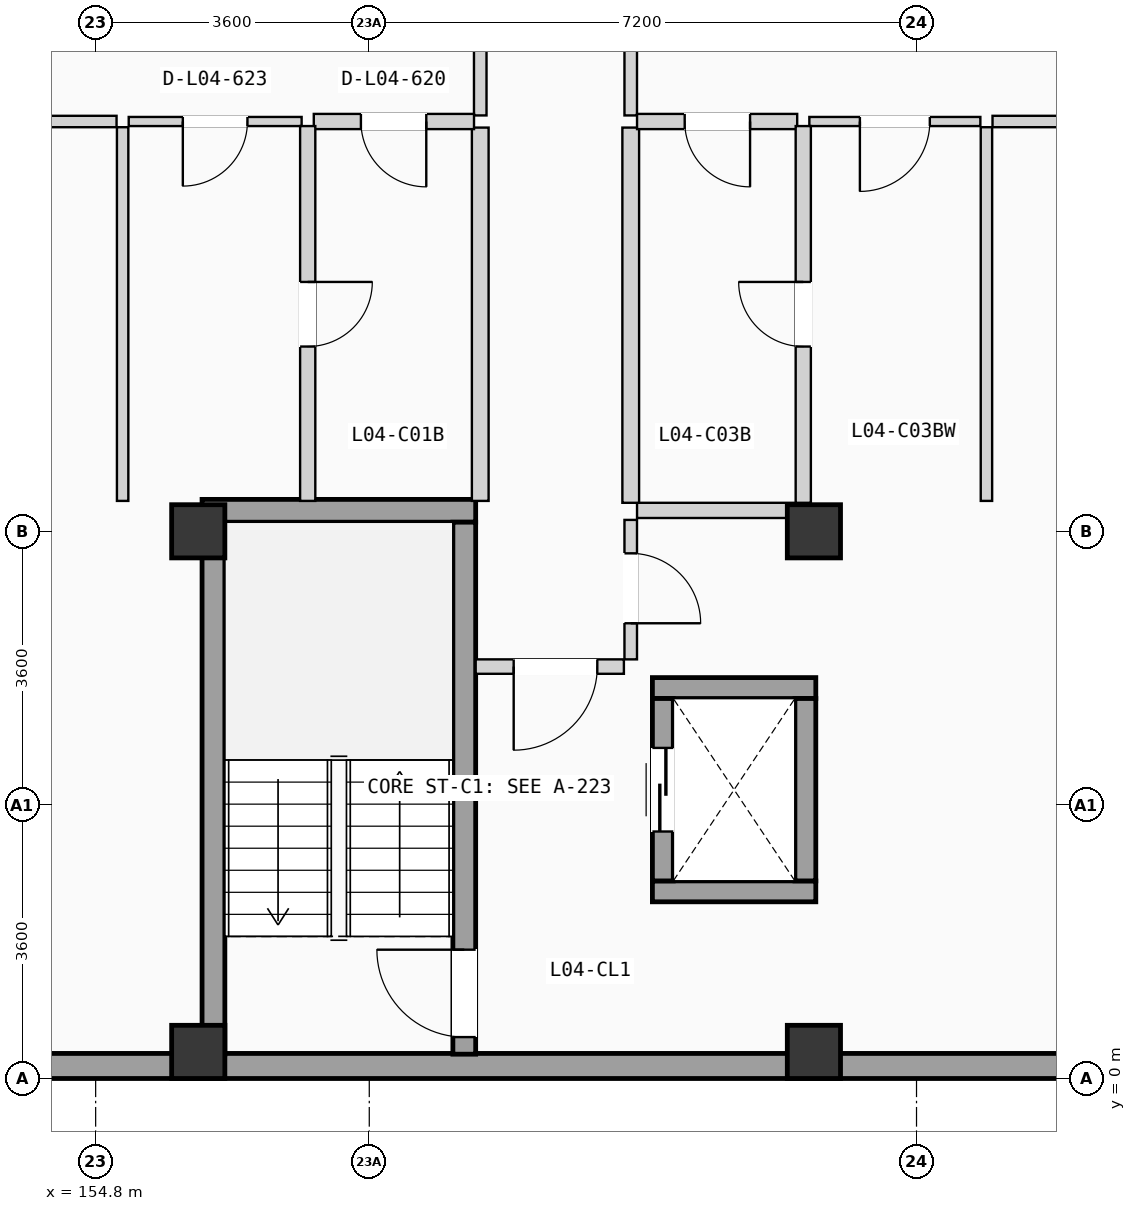
"""IFC4 building model, lengths in metres.
Left out: names, types, materials, properties, quantities, classifications, styles, units other than length and angle.
Written with IfcOpenShell. Run it as: python <this file> out.ifc"""

import sys

from ifc_helpers import new_model, si_unit, direction, frame, frame_2d, origin, origin_2d, place, context, subcontext, project, spatial, rectangle, extrude, element, fill, save


model = new_model("IFC4")
c1 = context("Model", 3, precision=1e-05, world=origin(), true_north=direction((0.0, 1.0)))
c2 = subcontext(c1, "Body", "Model", "MODEL_VIEW")
j1 = project(units=[si_unit("LENGTHUNIT", "METRE"), si_unit("PLANEANGLEUNIT", "RADIAN")], contexts=[c1])
p1 = place(None, origin())
s1 = spatial("IfcSite", under=j1, at=p1, CompositionType="ELEMENT")
p2 = place(p1, origin())
s2 = spatial("IfcBuilding", under=s1, at=p2, CompositionType="ELEMENT")
p3 = place(p2, frame((0.0, 0.0, 15.225)))
s3 = spatial("IfcBuildingStorey", under=s2, at=p3, CompositionType="ELEMENT", Elevation=15.225)
for number, where, z_axis, x_axis in (
    (1, (156.15, 0.35, 0.0), (0.0, 0.0, 1.0), (1.0, 0.0, 0.0)),
    (2, (156.15, 7.2, 0.0), (0.0, 0.0, 1.0), (1.0, 0.0, 0.0)),
    (3, (164.25, 0.35, 0.0), (0.0, 0.0, 1.0), (1.0, 0.0, 0.0)),
    (4, (164.25, 7.2, 0.0), (0.0, 0.0, 1.0), (1.0, 0.0, 0.0)),
):
    element("IfcColumn", number, at=place(p3, frame(where, z_axis=z_axis, x_axis=x_axis)), inside=s3, PredefinedType="COLUMN", context=c2, shape_type="SweptSolid", body=[
        extrude(rectangle(XDim=0.7, YDim=0.7, at=origin_2d()), origin(), (0.0, 0.0, 1.0), 3.15),
    ])
p4 = place(p3, frame((147.6, 0.165, 0.0), z_axis=(0.0, 0.0, 1.0), x_axis=(1.0, 0.0, 0.0)))
e5 = element("IfcWall", 5, at=p4, inside=s3, PredefinedType="SOLIDWALL", context=c2, shape_type="SweptSolid", body=[
    extrude(rectangle(XDim=25.2, YDim=0.33, at=frame_2d((12.6, 0.0))), origin(), (0.0, 0.0, 1.0), 2.89),
])
p5 = place(p3, frame((156.2, 7.47, 0.0), z_axis=(0.0, 0.0, 1.0), x_axis=(1.0, 0.0, 0.0)))
e6 = element("IfcWall", 6, at=p5, inside=s3, PredefinedType="SHEAR", context=c2, shape_type="SweptSolid", body=[
    extrude(rectangle(XDim=3.6, YDim=0.3, at=frame_2d((1.8, 0.0))), origin(), (0.0, 0.0, 1.0), 2.89),
])
p6 = place(p3, frame((156.35, 0.32, 0.0), z_axis=(0.0, 0.0, 1.0), x_axis=(0.0, 1.0, 0.0)))
e7 = element("IfcWall", 7, at=p6, inside=s3, PredefinedType="SHEAR", context=c2, shape_type="SweptSolid", body=[
    extrude(rectangle(XDim=7.0, YDim=0.3, at=frame_2d((3.5, 0.0))), origin(), (0.0, 0.0, 1.0), 2.89),
])
p7 = place(p3, frame((159.65, 0.32, 0.0), z_axis=(0.0, 0.0, 1.0), x_axis=(0.0, 1.0, 0.0)))
e8 = element("IfcWall", 8, at=p7, inside=s3, PredefinedType="SHEAR", context=c2, shape_type="SweptSolid", body=[
    extrude(rectangle(XDim=7.0, YDim=0.3, at=frame_2d((3.5, 0.0))), origin(), (0.0, 0.0, 1.0), 2.89),
])
p8 = place(p7, frame((0.225, 0.0, 0.0)))
e9 = element("IfcOpeningElement", 9, at=p8, cuts=e8, PredefinedType="OPENING", context=c2, shape_type="SweptSolid", body=[
    extrude(rectangle(XDim=1.15, YDim=2.12, at=frame_2d((0.575, 1.06))), frame((0.0, 0.16, 0.0), z_axis=(0.0, -1.0, 0.0), x_axis=(1.0, 0.0, 0.0)), (0.0, 0.0, 1.0), 0.32),
])
for number, where, z_axis, x_axis in (
    (10, (162.125, 2.462, 0.0), (0.0, 0.0, 1.0), (1.0, 0.0, 0.0)),
    (11, (162.125, 5.137, 0.0), (0.0, 0.0, 1.0), (1.0, 0.0, 0.0)),
):
    element("IfcWall", number, at=place(p3, frame(where, z_axis=z_axis, x_axis=x_axis)), inside=s3, PredefinedType="SHEAR", context=c2, shape_type="SweptSolid", body=[
        extrude(rectangle(XDim=2.15, YDim=0.275, at=frame_2d((1.075, 0.0))), origin(), (0.0, 0.0, 1.0), 2.89),
    ])
p9 = place(p3, frame((162.262, 2.6, 0.0), z_axis=(0.0, 0.0, 1.0), x_axis=(0.0, 1.0, 0.0)))
e12 = element("IfcWall", 12, at=p9, inside=s3, PredefinedType="SHEAR", context=c2, shape_type="SweptSolid", body=[
    extrude(rectangle(XDim=2.4, YDim=0.275, at=frame_2d((1.2, 0.0))), origin(), (0.0, 0.0, 1.0), 2.89),
])
p10 = place(p9, frame((0.65, 0.0, 0.0)))
e13 = element("IfcOpeningElement", 13, at=p10, cuts=e12, PredefinedType="OPENING", context=c2, shape_type="SweptSolid", body=[
    extrude(rectangle(XDim=1.1, YDim=2.15, at=frame_2d((0.55, 1.075))), frame((0.0, 0.147, 0.0), z_axis=(0.0, -1.0, 0.0), x_axis=(1.0, 0.0, 0.0)), (0.0, 0.0, 1.0), 0.295),
])
p11 = place(p3, frame((164.137, 2.6, 0.0), z_axis=(0.0, 0.0, 1.0), x_axis=(0.0, 1.0, 0.0)))
e14 = element("IfcWall", 14, at=p11, inside=s3, PredefinedType="SHEAR", context=c2, shape_type="SweptSolid", body=[
    extrude(rectangle(XDim=2.4, YDim=0.275, at=frame_2d((1.2, 0.0))), origin(), (0.0, 0.0, 1.0), 2.89),
])
p12 = place(p3, frame((159.8, 5.42, 0.0), z_axis=(0.0, 0.0, 1.0), x_axis=(1.0, 0.0, 0.0)))
e15 = element("IfcWall", 15, at=p12, inside=s3, PredefinedType="PARTITIONING", context=c2, shape_type="SweptSolid", body=[
    extrude(rectangle(XDim=1.95, YDim=0.19, at=frame_2d((0.975, 0.0))), origin(), (0.0, 0.0, 1.0), 2.87),
])
p13 = place(p12, frame((0.5, 0.0, 0.0)))
e16 = element("IfcOpeningElement", 16, at=p13, cuts=e15, PredefinedType="OPENING", context=c2, shape_type="SweptSolid", body=[
    extrude(rectangle(XDim=1.1, YDim=2.12, at=frame_2d((0.55, 1.06))), frame((0.0, 0.105, 0.0), z_axis=(0.0, -1.0, 0.0), x_axis=(1.0, 0.0, 0.0)), (0.0, 0.0, 1.0), 0.21),
])
p14 = place(p3, frame((161.84, 5.515, 0.0), z_axis=(0.0, 0.0, 1.0), x_axis=(0.0, 1.0, 0.0)))
e17 = element("IfcWall", 17, at=p14, inside=s3, PredefinedType="PARTITIONING", context=c2, shape_type="SweptSolid", body=[
    extrude(rectangle(XDim=1.835, YDim=0.165, at=frame_2d((0.917, 0.0))), origin(), (0.0, 0.0, 1.0), 2.87),
])
p15 = place(p14, frame((0.475, 0.0, 0.0)))
e18 = element("IfcOpeningElement", 18, at=p15, cuts=e17, PredefinedType="OPENING", context=c2, shape_type="SweptSolid", body=[
    extrude(rectangle(XDim=0.92, YDim=2.04, at=frame_2d((0.46, 1.02))), frame((0.0, 0.093, 0.0), z_axis=(0.0, -1.0, 0.0), x_axis=(1.0, 0.0, 0.0)), (0.0, 0.0, 1.0), 0.185),
])
p16 = place(p3, frame((161.923, 7.475, 0.0), z_axis=(0.0, 0.0, 1.0), x_axis=(1.0, 0.0, 0.0)))
e19 = element("IfcWall", 19, at=p16, inside=s3, PredefinedType="PLUMBINGWALL", context=c2, shape_type="SweptSolid", body=[
    extrude(rectangle(XDim=2.107, YDim=0.2, at=frame_2d((1.053, 0.0))), origin(), (0.0, 0.0, 1.0), 2.87),
])
p17 = place(p3, frame((159.86, 12.672, 0.0), z_axis=(0.0, 0.0, 1.0), x_axis=(0.0, 1.0, 0.0)))
e20 = element("IfcWall", 20, at=p17, inside=s3, PredefinedType="PARTITIONING", context=c2, shape_type="SweptSolid", body=[
    extrude(rectangle(XDim=5.958, YDim=0.165, at=frame_2d((2.979, 0.0))), origin(), (0.0, 0.0, 1.0), 2.87),
])
p18 = place(p17, frame((2.454, 0.0, 0.0)))
e21 = element("IfcOpeningElement", 21, at=p18, cuts=e20, PredefinedType="OPENING", context=c2, shape_type="SweptSolid", body=[
    extrude(rectangle(XDim=1.05, YDim=2.13, at=frame_2d((0.525, 1.065))), frame((0.0, 0.093, 0.0), z_axis=(0.0, -1.0, 0.0), x_axis=(1.0, 0.0, 0.0)), (0.0, 0.0, 1.0), 0.185),
])
p19 = place(p3, frame((159.86, 7.6, 0.0), z_axis=(0.0, 0.0, 1.0), x_axis=(0.0, 1.0, 0.0)))
e22 = element("IfcWall", 22, at=p19, inside=s3, PredefinedType="PLUMBINGWALL", context=c2, shape_type="SweptSolid", body=[
    extrude(rectangle(XDim=4.912, YDim=0.22, at=frame_2d((2.456, 0.0))), origin(), (0.0, 0.0, 1.0), 2.87),
])
p20 = place(p3, frame((161.84, 12.672, 0.0), z_axis=(0.0, 0.0, 1.0), x_axis=(0.0, 1.0, 0.0)))
e23 = element("IfcWall", 23, at=p20, inside=s3, PredefinedType="PARTITIONING", context=c2, shape_type="SweptSolid", body=[
    extrude(rectangle(XDim=5.958, YDim=0.165, at=frame_2d((2.979, 0.0))), origin(), (0.0, 0.0, 1.0), 2.87),
])
p21 = place(p20, frame((2.454, 0.0, 0.0)))
e24 = element("IfcOpeningElement", 24, at=p21, cuts=e23, PredefinedType="OPENING", context=c2, shape_type="SweptSolid", body=[
    extrude(rectangle(XDim=1.05, YDim=2.13, at=frame_2d((0.525, 1.065))), frame((0.0, 0.093, 0.0), z_axis=(0.0, -1.0, 0.0), x_axis=(1.0, 0.0, 0.0)), (0.0, 0.0, 1.0), 0.185),
])
p22 = place(p3, frame((161.84, 7.575, 0.0), z_axis=(0.0, 0.0, 1.0), x_axis=(0.0, 1.0, 0.0)))
e25 = element("IfcWall", 25, at=p22, inside=s3, PredefinedType="PLUMBINGWALL", context=c2, shape_type="SweptSolid", body=[
    extrude(rectangle(XDim=4.937, YDim=0.22, at=frame_2d((2.469, 0.0))), origin(), (0.0, 0.0, 1.0), 2.87),
])
p23 = place(p3, frame((157.67, 12.592, 0.0), z_axis=(0.0, 0.0, 1.0), x_axis=(1.0, 0.0, 0.0)))
e26 = element("IfcWall", 26, at=p23, inside=s3, PredefinedType="PLUMBINGWALL", context=c2, shape_type="SweptSolid", body=[
    extrude(rectangle(XDim=2.108, YDim=0.2, at=frame_2d((1.054, 0.0))), origin(), (0.0, 0.0, 1.0), 2.87),
])
p24 = place(p23, frame((0.62, 0.0, 0.0)))
e27 = element("IfcOpeningElement", 27, at=p24, cuts=e26, PredefinedType="OPENING", context=c2, shape_type="SweptSolid", body=[
    extrude(rectangle(XDim=0.86, YDim=2.0, at=frame_2d((0.43, 1.0))), frame((0.0, 0.11, 0.0), z_axis=(0.0, -1.0, 0.0), x_axis=(1.0, 0.0, 0.0)), (0.0, 0.0, 1.0), 0.22),
])
p25 = place(p3, frame((147.93, 12.592, 0.0), z_axis=(0.0, 0.0, 1.0), x_axis=(1.0, 0.0, 0.0)))
e28 = element("IfcWall", 28, at=p25, inside=s3, PredefinedType="PARTITIONING", context=c2, shape_type="SweptSolid", body=[
    extrude(rectangle(XDim=7.145, YDim=0.15, at=frame_2d((3.573, 0.0))), origin(), (0.0, 0.0, 1.0), 2.87),
])
p26 = place(p25, frame((3.062, 0.0, 0.0)))
e29 = element("IfcOpeningElement", 29, at=p26, cuts=e28, PredefinedType="OPENING", context=c2, shape_type="SweptSolid", body=[
    extrude(rectangle(XDim=1.04, YDim=2.08, at=frame_2d((0.52, 1.04))), frame((0.0, 0.085, 0.0), z_axis=(0.0, -1.0, 0.0), x_axis=(1.0, 0.0, 0.0)), (0.0, 0.0, 1.0), 0.17),
])
p27 = place(p3, frame((155.235, 12.592, 0.0), z_axis=(0.0, 0.0, 1.0), x_axis=(1.0, 0.0, 0.0)))
e30 = element("IfcWall", 30, at=p27, inside=s3, PredefinedType="PARTITIONING", context=c2, shape_type="SweptSolid", body=[
    extrude(rectangle(XDim=2.275, YDim=0.12, at=frame_2d((1.137, 0.0))), origin(), (0.0, 0.0, 1.0), 2.87),
])
p28 = place(p27, frame((0.712, 0.0, 0.0)))
e31 = element("IfcOpeningElement", 31, at=p28, cuts=e30, PredefinedType="OPENING", context=c2, shape_type="SweptSolid", body=[
    extrude(rectangle(XDim=0.85, YDim=2.01, at=frame_2d((0.425, 1.005))), frame((0.0, 0.07, 0.0), z_axis=(0.0, -1.0, 0.0), x_axis=(1.0, 0.0, 0.0)), (0.0, 0.0, 1.0), 0.14),
])
p29 = place(p3, frame((157.59, 7.6, 0.0), z_axis=(0.0, 0.0, 1.0), x_axis=(0.0, 1.0, 0.0)))
e32 = element("IfcWall", 32, at=p29, inside=s3, PredefinedType="PLUMBINGWALL", context=c2, shape_type="SweptSolid", body=[
    extrude(rectangle(XDim=4.932, YDim=0.2, at=frame_2d((2.466, 0.0))), origin(), (0.0, 0.0, 1.0), 2.87),
])
p30 = place(p29, frame((2.031, 0.0, 0.0)))
e33 = element("IfcOpeningElement", 33, at=p30, cuts=e32, PredefinedType="OPENING", context=c2, shape_type="SweptSolid", body=[
    extrude(rectangle(XDim=0.85, YDim=2.01, at=frame_2d((0.425, 1.005))), frame((0.0, 0.11, 0.0), z_axis=(0.0, -1.0, 0.0), x_axis=(1.0, 0.0, 0.0)), (0.0, 0.0, 1.0), 0.22),
])
p31 = place(p3, frame((155.155, 7.6, 0.0), z_axis=(0.0, 0.0, 1.0), x_axis=(0.0, 1.0, 0.0)))
e34 = element("IfcWall", 34, at=p31, inside=s3, PredefinedType="PARTITIONING", context=c2, shape_type="SweptSolid", body=[
    extrude(rectangle(XDim=4.917, YDim=0.15, at=frame_2d((2.458, 0.0))), origin(), (0.0, 0.0, 1.0), 2.87),
])
p32 = place(p3, frame((161.923, 12.592, 0.0), z_axis=(0.0, 0.0, 1.0), x_axis=(1.0, 0.0, 0.0)))
e35 = element("IfcWall", 35, at=p32, inside=s3, PredefinedType="PLUMBINGWALL", context=c2, shape_type="SweptSolid", body=[
    extrude(rectangle(XDim=2.107, YDim=0.2, at=frame_2d((1.053, 0.0))), origin(), (0.0, 0.0, 1.0), 2.87),
])
p33 = place(p32, frame((0.627, 0.0, 0.0)))
e36 = element("IfcOpeningElement", 36, at=p33, cuts=e35, PredefinedType="OPENING", context=c2, shape_type="SweptSolid", body=[
    extrude(rectangle(XDim=0.86, YDim=2.0, at=frame_2d((0.43, 1.0))), frame((0.0, 0.11, 0.0), z_axis=(0.0, -1.0, 0.0), x_axis=(1.0, 0.0, 0.0)), (0.0, 0.0, 1.0), 0.22),
])
p34 = place(p3, frame((166.6, 12.592, 0.0), z_axis=(0.0, 0.0, 1.0), x_axis=(1.0, 0.0, 0.0)))
e37 = element("IfcWall", 37, at=p34, inside=s3, PredefinedType="PARTITIONING", context=c2, shape_type="SweptSolid", body=[
    extrude(rectangle(XDim=5.87, YDim=0.15, at=frame_2d((2.935, 0.0))), origin(), (0.0, 0.0, 1.0), 2.87),
])
p35 = place(p34, frame((2.455, 0.0, 0.0)))
e38 = element("IfcOpeningElement", 38, at=p35, cuts=e37, PredefinedType="OPENING", context=c2, shape_type="SweptSolid", body=[
    extrude(rectangle(XDim=0.94, YDim=2.06, at=frame_2d((0.47, 1.03))), frame((0.0, 0.085, 0.0), z_axis=(0.0, -1.0, 0.0), x_axis=(1.0, 0.0, 0.0)), (0.0, 0.0, 1.0), 0.17),
])
p36 = place(p3, frame((164.19, 12.592, 0.0), z_axis=(0.0, 0.0, 1.0), x_axis=(1.0, 0.0, 0.0)))
e39 = element("IfcWall", 39, at=p36, inside=s3, PredefinedType="PARTITIONING", context=c2, shape_type="SweptSolid", body=[
    extrude(rectangle(XDim=2.25, YDim=0.12, at=frame_2d((1.125, 0.0))), origin(), (0.0, 0.0, 1.0), 2.87),
])
p37 = place(p36, frame((0.665, 0.0, 0.0)))
e40 = element("IfcOpeningElement", 40, at=p37, cuts=e39, PredefinedType="OPENING", context=c2, shape_type="SweptSolid", body=[
    extrude(rectangle(XDim=0.92, YDim=2.02, at=frame_2d((0.46, 1.01))), frame((0.0, 0.07, 0.0), z_axis=(0.0, -1.0, 0.0), x_axis=(1.0, 0.0, 0.0)), (0.0, 0.0, 1.0), 0.14),
])
p38 = place(p3, frame((164.11, 7.575, 0.0), z_axis=(0.0, 0.0, 1.0), x_axis=(0.0, 1.0, 0.0)))
e41 = element("IfcWall", 41, at=p38, inside=s3, PredefinedType="PLUMBINGWALL", context=c2, shape_type="SweptSolid", body=[
    extrude(rectangle(XDim=4.957, YDim=0.2, at=frame_2d((2.479, 0.0))), origin(), (0.0, 0.0, 1.0), 2.87),
])
p39 = place(p38, frame((2.056, 0.0, 0.0)))
e42 = element("IfcOpeningElement", 42, at=p39, cuts=e41, PredefinedType="OPENING", context=c2, shape_type="SweptSolid", body=[
    extrude(rectangle(XDim=0.85, YDim=2.01, at=frame_2d((0.425, 1.005))), frame((0.0, 0.11, 0.0), z_axis=(0.0, -1.0, 0.0), x_axis=(1.0, 0.0, 0.0)), (0.0, 0.0, 1.0), 0.22),
])
p40 = place(p3, frame((166.52, 7.6, 0.0), z_axis=(0.0, 0.0, 1.0), x_axis=(0.0, 1.0, 0.0)))
e43 = element("IfcWall", 43, at=p40, inside=s3, PredefinedType="PARTITIONING", context=c2, shape_type="SweptSolid", body=[
    extrude(rectangle(XDim=4.917, YDim=0.15, at=frame_2d((2.458, 0.0))), origin(), (0.0, 0.0, 1.0), 2.87),
])
p41 = place(p8, origin())
e44 = element("IfcDoor", 44, at=p41, inside=s3, OperationType="SINGLE_SWING_RIGHT", PredefinedType="DOOR", context=c2, shape_type="SweptSolid", body=[
    extrude(rectangle(XDim=1.15, YDim=2.12, at=frame_2d((0.575, 1.06))), frame((0.0, 0.025, 0.0), z_axis=(0.0, -1.0, 0.0), x_axis=(1.0, 0.0, 0.0)), (0.0, 0.0, 1.0), 0.05),
])
fill(e9, e44)
p42 = place(p10, origin())
e45 = element("IfcDoor", 45, at=p42, inside=s3, OperationType="SLIDING_TO_LEFT", PredefinedType="DOOR", context=c2, shape_type="SweptSolid", body=[
    extrude(rectangle(XDim=1.1, YDim=2.15, at=frame_2d((0.55, 1.075))), frame((0.0, 0.025, 0.0), z_axis=(0.0, -1.0, 0.0), x_axis=(1.0, 0.0, 0.0)), (0.0, 0.0, 1.0), 0.05),
])
fill(e13, e45)
p43 = place(p13, frame((1.1, 0.0, 0.0), z_axis=(0.0, 0.0, 1.0), x_axis=(-1.0, 0.0, 0.0)))
e46 = element("IfcDoor", 46, at=p43, inside=s3, OperationType="SINGLE_SWING_LEFT", PredefinedType="DOOR", context=c2, shape_type="SweptSolid", body=[
    extrude(rectangle(XDim=1.1, YDim=2.12, at=frame_2d((0.55, 1.06))), frame((0.0, 0.025, 0.0), z_axis=(0.0, -1.0, 0.0), x_axis=(1.0, 0.0, 0.0)), (0.0, 0.0, 1.0), 0.05),
])
fill(e16, e46)
p44 = place(p15, frame((0.92, 0.0, 0.0), z_axis=(0.0, 0.0, 1.0), x_axis=(-1.0, 0.0, 0.0)))
e47 = element("IfcDoor", 47, at=p44, inside=s3, OperationType="SINGLE_SWING_LEFT", PredefinedType="DOOR", context=c2, shape_type="SweptSolid", body=[
    extrude(rectangle(XDim=0.92, YDim=2.04, at=frame_2d((0.46, 1.02))), frame((0.0, 0.025, 0.0), z_axis=(0.0, -1.0, 0.0), x_axis=(1.0, 0.0, 0.0)), (0.0, 0.0, 1.0), 0.05),
])
fill(e18, e47)
p45 = place(p24, frame((0.86, 0.0, 0.0), z_axis=(0.0, 0.0, 1.0), x_axis=(-1.0, 0.0, 0.0)))
e48 = element("IfcDoor", 48, at=p45, inside=s3, OperationType="SINGLE_SWING_RIGHT", PredefinedType="DOOR", context=c2, shape_type="SweptSolid", body=[
    extrude(rectangle(XDim=0.86, YDim=2.0, at=frame_2d((0.43, 1.0))), frame((0.0, 0.025, 0.0), z_axis=(0.0, -1.0, 0.0), x_axis=(1.0, 0.0, 0.0)), (0.0, 0.0, 1.0), 0.05),
])
fill(e27, e48)
p46 = place(p28, frame((0.85, 0.0, 0.0), z_axis=(0.0, 0.0, 1.0), x_axis=(-1.0, 0.0, 0.0)))
e49 = element("IfcDoor", 49, at=p46, inside=s3, OperationType="SINGLE_SWING_LEFT", PredefinedType="DOOR", context=c2, shape_type="SweptSolid", body=[
    extrude(rectangle(XDim=0.85, YDim=2.01, at=frame_2d((0.425, 1.005))), frame((0.0, 0.025, 0.0), z_axis=(0.0, -1.0, 0.0), x_axis=(1.0, 0.0, 0.0)), (0.0, 0.0, 1.0), 0.05),
])
fill(e31, e49)
p47 = place(p30, frame((0.85, 0.0, 0.0), z_axis=(0.0, 0.0, 1.0), x_axis=(-1.0, 0.0, 0.0)))
e50 = element("IfcDoor", 50, at=p47, inside=s3, OperationType="SINGLE_SWING_RIGHT", PredefinedType="DOOR", context=c2, shape_type="SweptSolid", body=[
    extrude(rectangle(XDim=0.85, YDim=2.01, at=frame_2d((0.425, 1.005))), frame((0.0, 0.025, 0.0), z_axis=(0.0, -1.0, 0.0), x_axis=(1.0, 0.0, 0.0)), (0.0, 0.0, 1.0), 0.05),
])
fill(e33, e50)
p48 = place(p33, frame((0.86, 0.0, 0.0), z_axis=(0.0, 0.0, 1.0), x_axis=(-1.0, 0.0, 0.0)))
e51 = element("IfcDoor", 51, at=p48, inside=s3, OperationType="SINGLE_SWING_RIGHT", PredefinedType="DOOR", context=c2, shape_type="SweptSolid", body=[
    extrude(rectangle(XDim=0.86, YDim=2.0, at=frame_2d((0.43, 1.0))), frame((0.0, 0.025, 0.0), z_axis=(0.0, -1.0, 0.0), x_axis=(1.0, 0.0, 0.0)), (0.0, 0.0, 1.0), 0.05),
])
fill(e36, e51)
p49 = place(p37, frame((0.92, 0.0, 0.0), z_axis=(0.0, 0.0, 1.0), x_axis=(-1.0, 0.0, 0.0)))
e52 = element("IfcDoor", 52, at=p49, inside=s3, OperationType="SINGLE_SWING_LEFT", PredefinedType="DOOR", context=c2, shape_type="SweptSolid", body=[
    extrude(rectangle(XDim=0.92, YDim=2.02, at=frame_2d((0.46, 1.01))), frame((0.0, 0.025, 0.0), z_axis=(0.0, -1.0, 0.0), x_axis=(1.0, 0.0, 0.0)), (0.0, 0.0, 1.0), 0.05),
])
fill(e40, e52)
p50 = place(p39, origin())
e53 = element("IfcDoor", 53, at=p50, inside=s3, OperationType="SINGLE_SWING_RIGHT", PredefinedType="DOOR", context=c2, shape_type="SweptSolid", body=[
    extrude(rectangle(XDim=0.85, YDim=2.01, at=frame_2d((0.425, 1.005))), frame((0.0, 0.025, 0.0), z_axis=(0.0, -1.0, 0.0), x_axis=(1.0, 0.0, 0.0)), (0.0, 0.0, 1.0), 0.05),
])
fill(e42, e53)
save(model, sys.argv[1])
